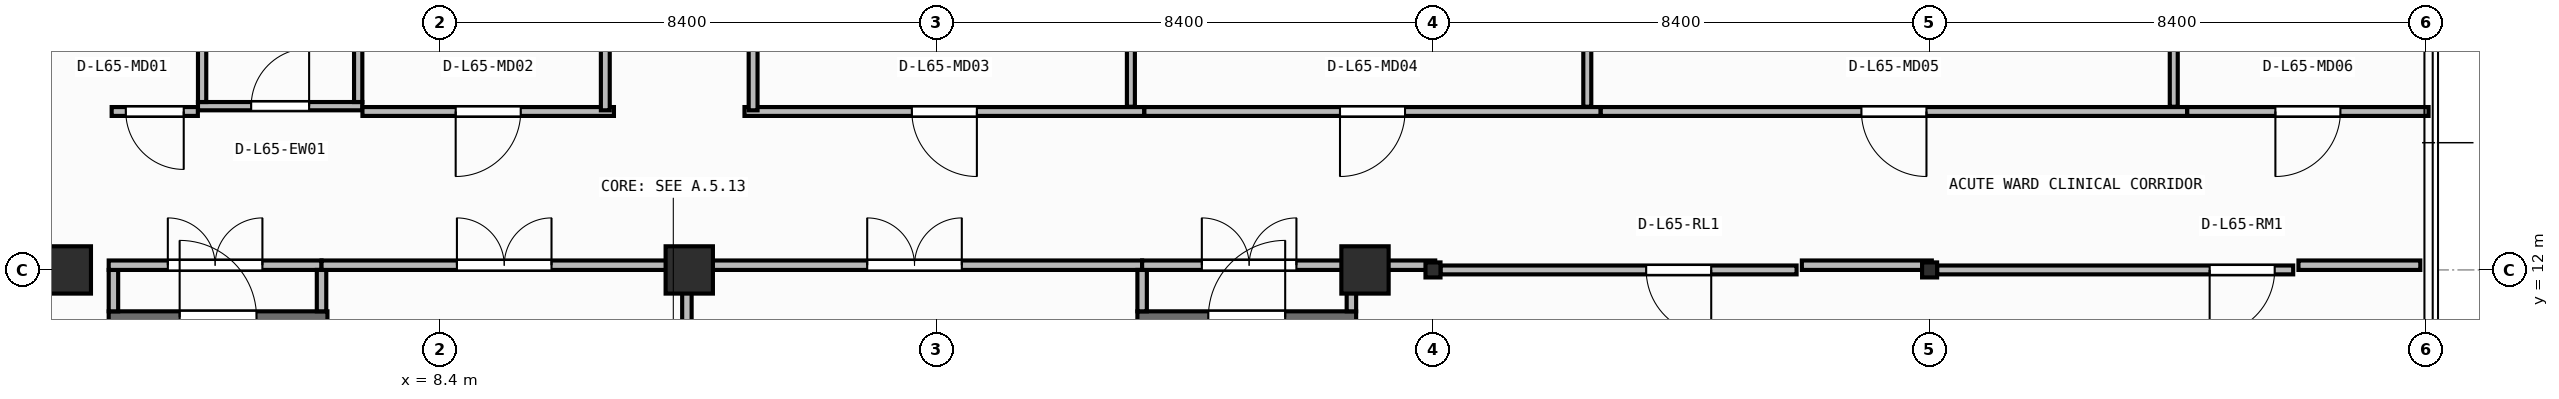
"""IFC4 building model, lengths in metres.
Left out: names, types, materials, properties, quantities, classifications, styles, units other than length and angle.
Written with IfcOpenShell. Run it as: python <this file> out.ifc"""

import sys

from ifc_helpers import new_model, si_unit, direction, frame, frame_2d, origin, origin_2d, place, context, subcontext, project, spatial, rectangle, i_section, extrude, element, fill, save


model = new_model("IFC4")
c1 = context("Model", 3, precision=1e-05, world=origin(), true_north=direction((0.0, 1.0)))
c2 = subcontext(c1, "Body", "Model", "MODEL_VIEW")
j1 = project(units=[si_unit("LENGTHUNIT", "METRE"), si_unit("PLANEANGLEUNIT", "RADIAN")], contexts=[c1])
p1 = place(None, origin())
s1 = spatial("IfcSite", under=j1, at=p1, CompositionType="ELEMENT")
p2 = place(p1, origin())
s2 = spatial("IfcBuilding", under=s1, at=p2, CompositionType="ELEMENT")
p3 = place(p2, frame((0.0, 0.0, 264.45)))
s3 = spatial("IfcBuildingStorey", under=s2, at=p3, CompositionType="ELEMENT", Elevation=264.45)
for number, where, z_axis, x_axis in (
    (1, (2.1, 12.0, 0.0), (0.0, 0.0, 1.0), (1.0, 0.0, 0.0)),
    (2, (12.62, 12.0, 0.0), (0.0, 0.0, 1.0), (1.0, 0.0, 0.0)),
    (3, (24.05, 12.0, 0.0), (0.0, 0.0, 1.0), (1.0, 0.0, 0.0)),
):
    element("IfcColumn", number, at=place(p3, frame(where, z_axis=z_axis, x_axis=x_axis)), inside=s3, PredefinedType="COLUMN", context=c2, shape_type="SweptSolid", body=[
        extrude(rectangle(XDim=0.8, YDim=0.8, at=origin_2d()), origin(), (0.0, 0.0, 1.0), 3.95),
    ])
for number, where, z_axis, x_axis in (
    (4, (25.2, 12.0, 0.0), (0.0, 0.0, 1.0), (1.0, 0.0, 0.0)),
    (5, (33.6, 12.0, 0.0), (0.0, 0.0, 1.0), (1.0, 0.0, 0.0)),
):
    element("IfcColumn", number, at=place(p3, frame(where, z_axis=z_axis, x_axis=x_axis)), inside=s3, PredefinedType="COLUMN", context=c2, shape_type="SweptSolid", body=[
        extrude(i_section(OverallWidth=0.254, OverallDepth=0.254, WebThickness=0.009, FlangeThickness=0.014, FilletRadius=0.013, at=origin_2d()), origin(), (0.0, 0.0, 1.0), 3.95),
    ])
p4 = place(p3, frame((2.8, 11.2, 0.0), z_axis=(0.0, 0.0, 1.0), x_axis=(1.0, 0.0, 0.0)))
e6 = element("IfcWall", 6, at=p4, inside=s3, PredefinedType="SHEAR", context=c2, shape_type="SweptSolid", body=[
    extrude(rectangle(XDim=3.7, YDim=0.2, at=frame_2d((1.85, 0.0))), origin(), (0.0, 0.0, 1.0), 3.71),
])
p5 = place(p4, frame((1.2, 0.0, 0.0)))
e7 = element("IfcOpeningElement", 7, at=p5, cuts=e6, PredefinedType="OPENING", context=c2, shape_type="SweptSolid", body=[
    extrude(rectangle(XDim=1.3, YDim=2.15, at=frame_2d((0.65, 1.075))), frame((0.0, 0.11, 0.0), z_axis=(0.0, -1.0, 0.0), x_axis=(1.0, 0.0, 0.0)), (0.0, 0.0, 1.0), 0.22),
])
p6 = place(p3, frame((20.2, 11.2, 0.0), z_axis=(0.0, 0.0, 1.0), x_axis=(1.0, 0.0, 0.0)))
e8 = element("IfcWall", 8, at=p6, inside=s3, PredefinedType="SHEAR", context=c2, shape_type="SweptSolid", body=[
    extrude(rectangle(XDim=3.7, YDim=0.2, at=frame_2d((1.85, 0.0))), origin(), (0.0, 0.0, 1.0), 3.71),
])
p7 = place(p6, frame((1.2, 0.0, 0.0)))
e9 = element("IfcOpeningElement", 9, at=p7, cuts=e8, PredefinedType="OPENING", context=c2, shape_type="SweptSolid", body=[
    extrude(rectangle(XDim=1.3, YDim=2.15, at=frame_2d((0.65, 1.075))), frame((0.0, 0.11, 0.0), z_axis=(0.0, -1.0, 0.0), x_axis=(1.0, 0.0, 0.0)), (0.0, 0.0, 1.0), 0.22),
])
p8 = place(p3, frame((2.88, 11.3, 0.0), z_axis=(0.0, 0.0, 1.0), x_axis=(0.0, 1.0, 0.0)))
e10 = element("IfcWall", 10, at=p8, inside=s3, PredefinedType="PARTITIONING", context=c2, shape_type="SweptSolid", body=[
    extrude(rectangle(XDim=0.7, YDim=0.16, at=frame_2d((0.35, 0.0))), origin(), (0.0, 0.0, 1.0), 3.71),
])
p9 = place(p3, frame((2.8, 12.08, 0.0), z_axis=(0.0, 0.0, 1.0), x_axis=(1.0, 0.0, 0.0)))
e11 = element("IfcWall", 11, at=p9, inside=s3, PredefinedType="PARTITIONING", context=c2, shape_type="SweptSolid", body=[
    extrude(rectangle(XDim=3.6, YDim=0.16, at=frame_2d((1.8, 0.0))), origin(), (0.0, 0.0, 1.0), 3.157),
])
p10 = place(p9, frame((1.0, 0.0, 0.0)))
e12 = element("IfcOpeningElement", 12, at=p10, cuts=e11, PredefinedType="OPENING", context=c2, shape_type="SweptSolid", body=[
    extrude(rectangle(XDim=1.6, YDim=2.05, at=frame_2d((0.8, 1.025))), frame((0.0, 0.09, 0.0), z_axis=(0.0, -1.0, 0.0), x_axis=(1.0, 0.0, 0.0)), (0.0, 0.0, 1.0), 0.18),
])
p11 = place(p3, frame((6.4, 11.3, 0.0), z_axis=(0.0, 0.0, 1.0), x_axis=(0.0, 1.0, 0.0)))
e13 = element("IfcWall", 13, at=p11, inside=s3, PredefinedType="PARTITIONING", context=c2, shape_type="SweptSolid", body=[
    extrude(rectangle(XDim=0.7, YDim=0.16, at=frame_2d((0.35, 0.0))), origin(), (0.0, 0.0, 1.0), 3.71),
])
p12 = place(p3, frame((6.4, 12.08, 0.0), z_axis=(0.0, 0.0, 1.0), x_axis=(1.0, 0.0, 0.0)))
e14 = element("IfcWall", 14, at=p12, inside=s3, PredefinedType="PARTITIONING", context=c2, shape_type="SweptSolid", body=[
    extrude(rectangle(XDim=6.18, YDim=0.16, at=frame_2d((3.09, 0.0))), origin(), (0.0, 0.0, 1.0), 3.157),
])
p13 = place(p12, frame((2.29, 0.0, 0.0)))
e15 = element("IfcOpeningElement", 15, at=p13, cuts=e14, PredefinedType="OPENING", context=c2, shape_type="SweptSolid", body=[
    extrude(rectangle(XDim=1.6, YDim=2.05, at=frame_2d((0.8, 1.025))), frame((0.0, 0.09, 0.0), z_axis=(0.0, -1.0, 0.0), x_axis=(1.0, 0.0, 0.0)), (0.0, 0.0, 1.0), 0.18),
])
p14 = place(p3, frame((12.58, 9.21, 0.0), z_axis=(0.0, 0.0, 1.0), x_axis=(0.0, 1.0, 0.0)))
e16 = element("IfcWall", 16, at=p14, inside=s3, PredefinedType="PARTITIONING", context=c2, shape_type="SweptSolid", body=[
    extrude(rectangle(XDim=2.79, YDim=0.16, at=frame_2d((1.395, 0.0))), origin(), (0.0, 0.0, 1.0), 3.71),
])
p15 = place(p3, frame((12.58, 12.08, 0.0), z_axis=(0.0, 0.0, 1.0), x_axis=(1.0, 0.0, 0.0)))
e17 = element("IfcWall", 17, at=p15, inside=s3, PredefinedType="PARTITIONING", context=c2, shape_type="SweptSolid", body=[
    extrude(rectangle(XDim=7.7, YDim=0.16, at=frame_2d((3.85, 0.0))), origin(), (0.0, 0.0, 1.0), 3.157),
])
p16 = place(p15, frame((3.05, 0.0, 0.0)))
e18 = element("IfcOpeningElement", 18, at=p16, cuts=e17, PredefinedType="OPENING", context=c2, shape_type="SweptSolid", body=[
    extrude(rectangle(XDim=1.6, YDim=2.05, at=frame_2d((0.8, 1.025))), frame((0.0, 0.09, 0.0), z_axis=(0.0, -1.0, 0.0), x_axis=(1.0, 0.0, 0.0)), (0.0, 0.0, 1.0), 0.18),
])
p17 = place(p3, frame((20.28, 11.3, 0.0), z_axis=(0.0, 0.0, 1.0), x_axis=(0.0, 1.0, 0.0)))
e19 = element("IfcWall", 19, at=p17, inside=s3, PredefinedType="PARTITIONING", context=c2, shape_type="SweptSolid", body=[
    extrude(rectangle(XDim=0.7, YDim=0.16, at=frame_2d((0.35, 0.0))), origin(), (0.0, 0.0, 1.0), 3.71),
])
p18 = place(p3, frame((20.28, 12.08, 0.0), z_axis=(0.0, 0.0, 1.0), x_axis=(1.0, 0.0, 0.0)))
e20 = element("IfcWall", 20, at=p18, inside=s3, PredefinedType="PARTITIONING", context=c2, shape_type="SweptSolid", body=[
    extrude(rectangle(XDim=3.62, YDim=0.16, at=frame_2d((1.81, 0.0))), origin(), (0.0, 0.0, 1.0), 3.157),
])
p19 = place(p18, frame((1.01, 0.0, 0.0)))
e21 = element("IfcOpeningElement", 21, at=p19, cuts=e20, PredefinedType="OPENING", context=c2, shape_type="SweptSolid", body=[
    extrude(rectangle(XDim=1.6, YDim=2.05, at=frame_2d((0.8, 1.025))), frame((0.0, 0.09, 0.0), z_axis=(0.0, -1.0, 0.0), x_axis=(1.0, 0.0, 0.0)), (0.0, 0.0, 1.0), 0.18),
])
p20 = place(p3, frame((23.82, 11.3, 0.0), z_axis=(0.0, 0.0, 1.0), x_axis=(0.0, 1.0, 0.0)))
e22 = element("IfcWall", 22, at=p20, inside=s3, PredefinedType="PARTITIONING", context=c2, shape_type="SweptSolid", body=[
    extrude(rectangle(XDim=0.7, YDim=0.16, at=frame_2d((0.35, 0.0))), origin(), (0.0, 0.0, 1.0), 3.71),
])
p21 = place(p3, frame((4.31, 14.77, 0.0), z_axis=(0.0, 0.0, 1.0), x_axis=(1.0, 0.0, 0.0)))
e23 = element("IfcWall", 23, at=p21, inside=s3, PredefinedType="PARTITIONING", context=c2, shape_type="SweptSolid", body=[
    extrude(rectangle(XDim=2.78, YDim=0.14, at=frame_2d((1.39, 0.0))), origin(), (0.0, 0.0, 1.0), 3.71),
])
p22 = place(p21, frame((0.9, 0.0, 0.0)))
e24 = element("IfcOpeningElement", 24, at=p22, cuts=e23, PredefinedType="OPENING", context=c2, shape_type="SweptSolid", body=[
    extrude(rectangle(XDim=0.98, YDim=2.1, at=frame_2d((0.49, 1.05))), frame((0.0, 0.08, 0.0), z_axis=(0.0, -1.0, 0.0), x_axis=(1.0, 0.0, 0.0)), (0.0, 0.0, 1.0), 0.16),
])
for number, where, z_axis, x_axis in (
    (25, (4.38, 14.84, 0.0), (0.0, 0.0, 1.0), (0.0, 1.0, 0.0)),
    (26, (7.02, 14.84, 0.0), (0.0, 0.0, 1.0), (0.0, 1.0, 0.0)),
):
    element("IfcWall", number, at=place(p3, frame(where, z_axis=z_axis, x_axis=x_axis)), inside=s3, PredefinedType="PARTITIONING", context=c2, shape_type="SweptSolid", body=[
        extrude(rectangle(XDim=2.2, YDim=0.14, at=frame_2d((1.1, 0.0))), origin(), (0.0, 0.0, 1.0), 3.71),
    ])
p23 = place(p3, frame((31.35, 12.0, 0.0), z_axis=(0.0, 0.0, 1.0), x_axis=(-1.0, 0.0, 0.0)))
e27 = element("IfcWall", 27, at=p23, inside=s3, PredefinedType="PARTITIONING", context=c2, shape_type="SweptSolid", body=[
    extrude(rectangle(XDim=6.023, YDim=0.15, at=frame_2d((3.012, 0.0))), origin(), (0.0, 0.0, 1.0), 3.157),
])
p24 = place(p23, frame((1.444, 0.0, 0.0)))
e28 = element("IfcOpeningElement", 28, at=p24, cuts=e27, PredefinedType="OPENING", context=c2, shape_type="SweptSolid", body=[
    extrude(rectangle(XDim=1.1, YDim=2.1, at=frame_2d((0.55, 1.05))), frame((0.0, 0.085, 0.0), z_axis=(0.0, -1.0, 0.0), x_axis=(1.0, 0.0, 0.0)), (0.0, 0.0, 1.0), 0.17),
])
p25 = place(p3, frame((39.75, 12.0, 0.0), z_axis=(0.0, 0.0, 1.0), x_axis=(-1.0, 0.0, 0.0)))
e29 = element("IfcWall", 29, at=p25, inside=s3, PredefinedType="PARTITIONING", context=c2, shape_type="SweptSolid", body=[
    extrude(rectangle(XDim=6.023, YDim=0.15, at=frame_2d((3.011, 0.0))), origin(), (0.0, 0.0, 1.0), 3.71),
])
p26 = place(p25, frame((0.313, 0.0, 0.0)))
e30 = element("IfcOpeningElement", 30, at=p26, cuts=e29, PredefinedType="OPENING", context=c2, shape_type="SweptSolid", body=[
    extrude(rectangle(XDim=1.1, YDim=2.1, at=frame_2d((0.55, 1.05))), frame((0.0, 0.085, 0.0), z_axis=(0.0, -1.0, 0.0), x_axis=(1.0, 0.0, 0.0)), (0.0, 0.0, 1.0), 0.17),
])
p27 = place(p3, frame((4.308, 14.68, 0.0), z_axis=(0.0, 0.0, 1.0), x_axis=(-1.0, 0.0, 0.0)))
e31 = element("IfcWall", 31, at=p27, inside=s3, PredefinedType="PARTITIONING", context=c2, shape_type="SweptSolid", body=[
    extrude(rectangle(XDim=1.458, YDim=0.15, at=frame_2d((0.729, 0.0))), origin(), (0.0, 0.0, 1.0), 3.71),
])
p28 = place(p27, frame((0.239, 0.0, 0.0)))
e32 = element("IfcOpeningElement", 32, at=p28, cuts=e31, PredefinedType="OPENING", context=c2, shape_type="SweptSolid", body=[
    extrude(rectangle(XDim=0.98, YDim=2.1, at=frame_2d((0.49, 1.05))), frame((0.0, 0.085, 0.0), z_axis=(0.0, -1.0, 0.0), x_axis=(1.0, 0.0, 0.0)), (0.0, 0.0, 1.0), 0.17),
])
p29 = place(p3, frame((11.346, 14.68, 0.0), z_axis=(0.0, 0.0, 1.0), x_axis=(-1.0, 0.0, 0.0)))
e33 = element("IfcWall", 33, at=p29, inside=s3, PredefinedType="PARTITIONING", context=c2, shape_type="SweptSolid", body=[
    extrude(rectangle(XDim=4.254, YDim=0.15, at=frame_2d((2.127, 0.0))), origin(), (0.0, 0.0, 1.0), 3.71),
])
p30 = place(p29, frame((1.577, 0.0, 0.0)))
e34 = element("IfcOpeningElement", 34, at=p30, cuts=e33, PredefinedType="OPENING", context=c2, shape_type="SweptSolid", body=[
    extrude(rectangle(XDim=1.1, YDim=2.1, at=frame_2d((0.55, 1.05))), frame((0.0, 0.085, 0.0), z_axis=(0.0, -1.0, 0.0), x_axis=(1.0, 0.0, 0.0)), (0.0, 0.0, 1.0), 0.17),
])
p31 = place(p3, frame((20.316, 14.68, 0.0), z_axis=(0.0, 0.0, 1.0), x_axis=(-1.0, 0.0, 0.0)))
e35 = element("IfcWall", 35, at=p31, inside=s3, PredefinedType="PARTITIONING", context=c2, shape_type="SweptSolid", body=[
    extrude(rectangle(XDim=6.762, YDim=0.15, at=frame_2d((3.381, 0.0))), origin(), (0.0, 0.0, 1.0), 3.71),
])
p32 = place(p31, frame((2.831, 0.0, 0.0)))
e36 = element("IfcOpeningElement", 36, at=p32, cuts=e35, PredefinedType="OPENING", context=c2, shape_type="SweptSolid", body=[
    extrude(rectangle(XDim=1.1, YDim=2.1, at=frame_2d((0.55, 1.05))), frame((0.0, 0.085, 0.0), z_axis=(0.0, -1.0, 0.0), x_axis=(1.0, 0.0, 0.0)), (0.0, 0.0, 1.0), 0.17),
])
p33 = place(p3, frame((28.036, 14.68, 0.0), z_axis=(0.0, 0.0, 1.0), x_axis=(-1.0, 0.0, 0.0)))
e37 = element("IfcWall", 37, at=p33, inside=s3, PredefinedType="PARTITIONING", context=c2, shape_type="SweptSolid", body=[
    extrude(rectangle(XDim=7.718, YDim=0.15, at=frame_2d((3.859, 0.0))), origin(), (0.0, 0.0, 1.0), 3.71),
])
p34 = place(p33, frame((3.309, 0.0, 0.0)))
e38 = element("IfcOpeningElement", 38, at=p34, cuts=e37, PredefinedType="OPENING", context=c2, shape_type="SweptSolid", body=[
    extrude(rectangle(XDim=1.1, YDim=2.1, at=frame_2d((0.55, 1.05))), frame((0.0, 0.085, 0.0), z_axis=(0.0, -1.0, 0.0), x_axis=(1.0, 0.0, 0.0)), (0.0, 0.0, 1.0), 0.17),
])
p35 = place(p3, frame((37.956, 14.68, 0.0), z_axis=(0.0, 0.0, 1.0), x_axis=(-1.0, 0.0, 0.0)))
e39 = element("IfcWall", 39, at=p35, inside=s3, PredefinedType="PARTITIONING", context=c2, shape_type="SweptSolid", body=[
    extrude(rectangle(XDim=9.918, YDim=0.15, at=frame_2d((4.959, 0.0))), origin(), (0.0, 0.0, 1.0), 3.71),
])
p36 = place(p35, frame((4.409, 0.0, 0.0)))
e40 = element("IfcOpeningElement", 40, at=p36, cuts=e39, PredefinedType="OPENING", context=c2, shape_type="SweptSolid", body=[
    extrude(rectangle(XDim=1.1, YDim=2.1, at=frame_2d((0.55, 1.05))), frame((0.0, 0.085, 0.0), z_axis=(0.0, -1.0, 0.0), x_axis=(1.0, 0.0, 0.0)), (0.0, 0.0, 1.0), 0.17),
])
p37 = place(p3, frame((42.04, 14.68, 0.0), z_axis=(0.0, 0.0, 1.0), x_axis=(-1.0, 0.0, 0.0)))
e41 = element("IfcWall", 41, at=p37, inside=s3, PredefinedType="PARTITIONING", context=c2, shape_type="SweptSolid", body=[
    extrude(rectangle(XDim=4.082, YDim=0.15, at=frame_2d((2.041, 0.0))), origin(), (0.0, 0.0, 1.0), 3.71),
])
p38 = place(p37, frame((1.491, 0.0, 0.0)))
e42 = element("IfcOpeningElement", 42, at=p38, cuts=e41, PredefinedType="OPENING", context=c2, shape_type="SweptSolid", body=[
    extrude(rectangle(XDim=1.1, YDim=2.1, at=frame_2d((0.55, 1.05))), frame((0.0, 0.085, 0.0), z_axis=(0.0, -1.0, 0.0), x_axis=(1.0, 0.0, 0.0)), (0.0, 0.0, 1.0), 0.17),
])
for number, where, z_axis, x_axis in (
    (43, (11.2, 21.066, 0.0), (0.0, 0.0, 1.0), (0.0, -1.0, 0.0)),
    (44, (13.7, 14.7, 0.0), (0.0, 0.0, 1.0), (0.0, 1.0, 0.0)),
):
    element("IfcWall", number, at=place(p3, frame(where, z_axis=z_axis, x_axis=x_axis)), inside=s3, PredefinedType="PARTITIONING", context=c2, shape_type="SweptSolid", body=[
        extrude(rectangle(XDim=6.366, YDim=0.15, at=frame_2d((3.183, 0.0))), origin(), (0.0, 0.0, 1.0), 3.71),
    ])
for number, where, z_axis, x_axis in (
    (45, (20.09, 14.76, 0.0), (0.0, 0.0, 1.0), (0.0, 1.0, 0.0)),
    (46, (27.81, 14.76, 0.0), (0.0, 0.0, 1.0), (0.0, 1.0, 0.0)),
    (47, (37.73, 14.76, 0.0), (0.0, 0.0, 1.0), (0.0, 1.0, 0.0)),
):
    element("IfcWall", number, at=place(p3, frame(where, z_axis=z_axis, x_axis=x_axis)), inside=s3, PredefinedType="PARTITIONING", context=c2, shape_type="SweptSolid", body=[
        extrude(rectangle(XDim=6.08, YDim=0.135, at=frame_2d((3.04, 0.0))), origin(), (0.0, 0.0, 1.0), 3.71),
    ])
p39 = place(p3, frame((24.02, 12.08, 0.0), z_axis=(0.0, 0.0, 1.0), x_axis=(1.0, 0.0, 0.0)))
e48 = element("IfcWall", 48, at=p39, inside=s3, PredefinedType="PARTITIONING", context=c2, shape_type="SweptSolid", body=[
    extrude(rectangle(XDim=1.218, YDim=0.16, at=frame_2d((0.609, 0.0))), origin(), (0.0, 0.0, 1.0), 3.157),
])
p40 = place(p3, frame((31.439, 12.08, 0.0), z_axis=(0.0, 0.0, 1.0), x_axis=(1.0, 0.0, 0.0)))
e49 = element("IfcWall", 49, at=p40, inside=s3, PredefinedType="PARTITIONING", context=c2, shape_type="SweptSolid", body=[
    extrude(rectangle(XDim=2.198, YDim=0.16, at=frame_2d((1.099, 0.0))), origin(), (0.0, 0.0, 1.0), 3.157),
])
p41 = place(p3, frame((39.839, 12.08, 0.0), z_axis=(0.0, 0.0, 1.0), x_axis=(1.0, 0.0, 0.0)))
e50 = element("IfcWall", 50, at=p41, inside=s3, PredefinedType="PARTITIONING", context=c2, shape_type="SweptSolid", body=[
    extrude(rectangle(XDim=2.061, YDim=0.16, at=frame_2d((1.03, 0.0))), origin(), (0.0, 0.0, 1.0), 3.71),
])
p42 = place(p5, origin())
e51 = element("IfcDoor", 51, at=p42, inside=s3, OperationType="SINGLE_SWING_LEFT", PredefinedType="DOOR", context=c2, shape_type="SweptSolid", body=[
    extrude(rectangle(XDim=1.3, YDim=2.15, at=frame_2d((0.65, 1.075))), frame((0.0, 0.025, 0.0), z_axis=(0.0, -1.0, 0.0), x_axis=(1.0, 0.0, 0.0)), (0.0, 0.0, 1.0), 0.05),
])
fill(e7, e51)
p43 = place(p7, origin())
e52 = element("IfcDoor", 52, at=p43, inside=s3, OperationType="SINGLE_SWING_RIGHT", PredefinedType="DOOR", context=c2, shape_type="SweptSolid", body=[
    extrude(rectangle(XDim=1.3, YDim=2.15, at=frame_2d((0.65, 1.075))), frame((0.0, 0.025, 0.0), z_axis=(0.0, -1.0, 0.0), x_axis=(1.0, 0.0, 0.0)), (0.0, 0.0, 1.0), 0.05),
])
fill(e9, e52)
p44 = place(p10, origin())
e53 = element("IfcDoor", 53, at=p44, inside=s3, OperationType="DOUBLE_DOOR_SINGLE_SWING", PredefinedType="DOOR", context=c2, shape_type="SweptSolid", body=[
    extrude(rectangle(XDim=1.6, YDim=2.05, at=frame_2d((0.8, 1.025))), frame((0.0, 0.025, 0.0), z_axis=(0.0, -1.0, 0.0), x_axis=(1.0, 0.0, 0.0)), (0.0, 0.0, 1.0), 0.05),
])
fill(e12, e53)
p45 = place(p13, origin())
e54 = element("IfcDoor", 54, at=p45, inside=s3, OperationType="DOUBLE_DOOR_SINGLE_SWING", PredefinedType="DOOR", context=c2, shape_type="SweptSolid", body=[
    extrude(rectangle(XDim=1.6, YDim=2.05, at=frame_2d((0.8, 1.025))), frame((0.0, 0.025, 0.0), z_axis=(0.0, -1.0, 0.0), x_axis=(1.0, 0.0, 0.0)), (0.0, 0.0, 1.0), 0.05),
])
fill(e15, e54)
p46 = place(p16, origin())
e55 = element("IfcDoor", 55, at=p46, inside=s3, OperationType="DOUBLE_DOOR_SINGLE_SWING", PredefinedType="DOOR", context=c2, shape_type="SweptSolid", body=[
    extrude(rectangle(XDim=1.6, YDim=2.05, at=frame_2d((0.8, 1.025))), frame((0.0, 0.025, 0.0), z_axis=(0.0, -1.0, 0.0), x_axis=(1.0, 0.0, 0.0)), (0.0, 0.0, 1.0), 0.05),
])
fill(e18, e55)
p47 = place(p19, origin())
e56 = element("IfcDoor", 56, at=p47, inside=s3, OperationType="DOUBLE_DOOR_SINGLE_SWING", PredefinedType="DOOR", context=c2, shape_type="SweptSolid", body=[
    extrude(rectangle(XDim=1.6, YDim=2.05, at=frame_2d((0.8, 1.025))), frame((0.0, 0.025, 0.0), z_axis=(0.0, -1.0, 0.0), x_axis=(1.0, 0.0, 0.0)), (0.0, 0.0, 1.0), 0.05),
])
fill(e21, e56)
p48 = place(p22, origin())
e57 = element("IfcDoor", 57, at=p48, inside=s3, OperationType="SINGLE_SWING_RIGHT", PredefinedType="DOOR", context=c2, shape_type="SweptSolid", body=[
    extrude(rectangle(XDim=0.98, YDim=2.1, at=frame_2d((0.49, 1.05))), frame((0.0, 0.025, 0.0), z_axis=(0.0, -1.0, 0.0), x_axis=(1.0, 0.0, 0.0)), (0.0, 0.0, 1.0), 0.05),
])
fill(e24, e57)
p49 = place(p24, origin())
e58 = element("IfcDoor", 58, at=p49, inside=s3, OperationType="SINGLE_SWING_LEFT", PredefinedType="DOOR", context=c2, shape_type="SweptSolid", body=[
    extrude(rectangle(XDim=1.1, YDim=2.1, at=frame_2d((0.55, 1.05))), frame((0.0, 0.025, 0.0), z_axis=(0.0, -1.0, 0.0), x_axis=(1.0, 0.0, 0.0)), (0.0, 0.0, 1.0), 0.05),
])
fill(e28, e58)
p50 = place(p26, origin())
e59 = element("IfcDoor", 59, at=p50, inside=s3, OperationType="SINGLE_SWING_RIGHT", PredefinedType="DOOR", context=c2, shape_type="SweptSolid", body=[
    extrude(rectangle(XDim=1.1, YDim=2.1, at=frame_2d((0.55, 1.05))), frame((0.0, 0.025, 0.0), z_axis=(0.0, -1.0, 0.0), x_axis=(1.0, 0.0, 0.0)), (0.0, 0.0, 1.0), 0.05),
])
fill(e30, e59)
p51 = place(p28, origin())
e60 = element("IfcDoor", 60, at=p51, inside=s3, OperationType="SINGLE_SWING_LEFT", PredefinedType="DOOR", context=c2, shape_type="SweptSolid", body=[
    extrude(rectangle(XDim=0.98, YDim=2.1, at=frame_2d((0.49, 1.05))), frame((0.0, 0.025, 0.0), z_axis=(0.0, -1.0, 0.0), x_axis=(1.0, 0.0, 0.0)), (0.0, 0.0, 1.0), 0.05),
])
fill(e32, e60)
p52 = place(p30, origin())
e61 = element("IfcDoor", 61, at=p52, inside=s3, OperationType="SINGLE_SWING_RIGHT", PredefinedType="DOOR", context=c2, shape_type="SweptSolid", body=[
    extrude(rectangle(XDim=1.1, YDim=2.1, at=frame_2d((0.55, 1.05))), frame((0.0, 0.025, 0.0), z_axis=(0.0, -1.0, 0.0), x_axis=(1.0, 0.0, 0.0)), (0.0, 0.0, 1.0), 0.05),
])
fill(e34, e61)
p53 = place(p32, origin())
e62 = element("IfcDoor", 62, at=p53, inside=s3, OperationType="SINGLE_SWING_LEFT", PredefinedType="DOOR", context=c2, shape_type="SweptSolid", body=[
    extrude(rectangle(XDim=1.1, YDim=2.1, at=frame_2d((0.55, 1.05))), frame((0.0, 0.025, 0.0), z_axis=(0.0, -1.0, 0.0), x_axis=(1.0, 0.0, 0.0)), (0.0, 0.0, 1.0), 0.05),
])
fill(e36, e62)
p54 = place(p34, origin())
e63 = element("IfcDoor", 63, at=p54, inside=s3, OperationType="SINGLE_SWING_RIGHT", PredefinedType="DOOR", context=c2, shape_type="SweptSolid", body=[
    extrude(rectangle(XDim=1.1, YDim=2.1, at=frame_2d((0.55, 1.05))), frame((0.0, 0.025, 0.0), z_axis=(0.0, -1.0, 0.0), x_axis=(1.0, 0.0, 0.0)), (0.0, 0.0, 1.0), 0.05),
])
fill(e38, e63)
p55 = place(p36, origin())
e64 = element("IfcDoor", 64, at=p55, inside=s3, OperationType="SINGLE_SWING_LEFT", PredefinedType="DOOR", context=c2, shape_type="SweptSolid", body=[
    extrude(rectangle(XDim=1.1, YDim=2.1, at=frame_2d((0.55, 1.05))), frame((0.0, 0.025, 0.0), z_axis=(0.0, -1.0, 0.0), x_axis=(1.0, 0.0, 0.0)), (0.0, 0.0, 1.0), 0.05),
])
fill(e40, e64)
p56 = place(p38, origin())
e65 = element("IfcDoor", 65, at=p56, inside=s3, OperationType="SINGLE_SWING_RIGHT", PredefinedType="DOOR", context=c2, shape_type="SweptSolid", body=[
    extrude(rectangle(XDim=1.1, YDim=2.1, at=frame_2d((0.55, 1.05))), frame((0.0, 0.025, 0.0), z_axis=(0.0, -1.0, 0.0), x_axis=(1.0, 0.0, 0.0)), (0.0, 0.0, 1.0), 0.05),
])
fill(e42, e65)
save(model, sys.argv[1])
